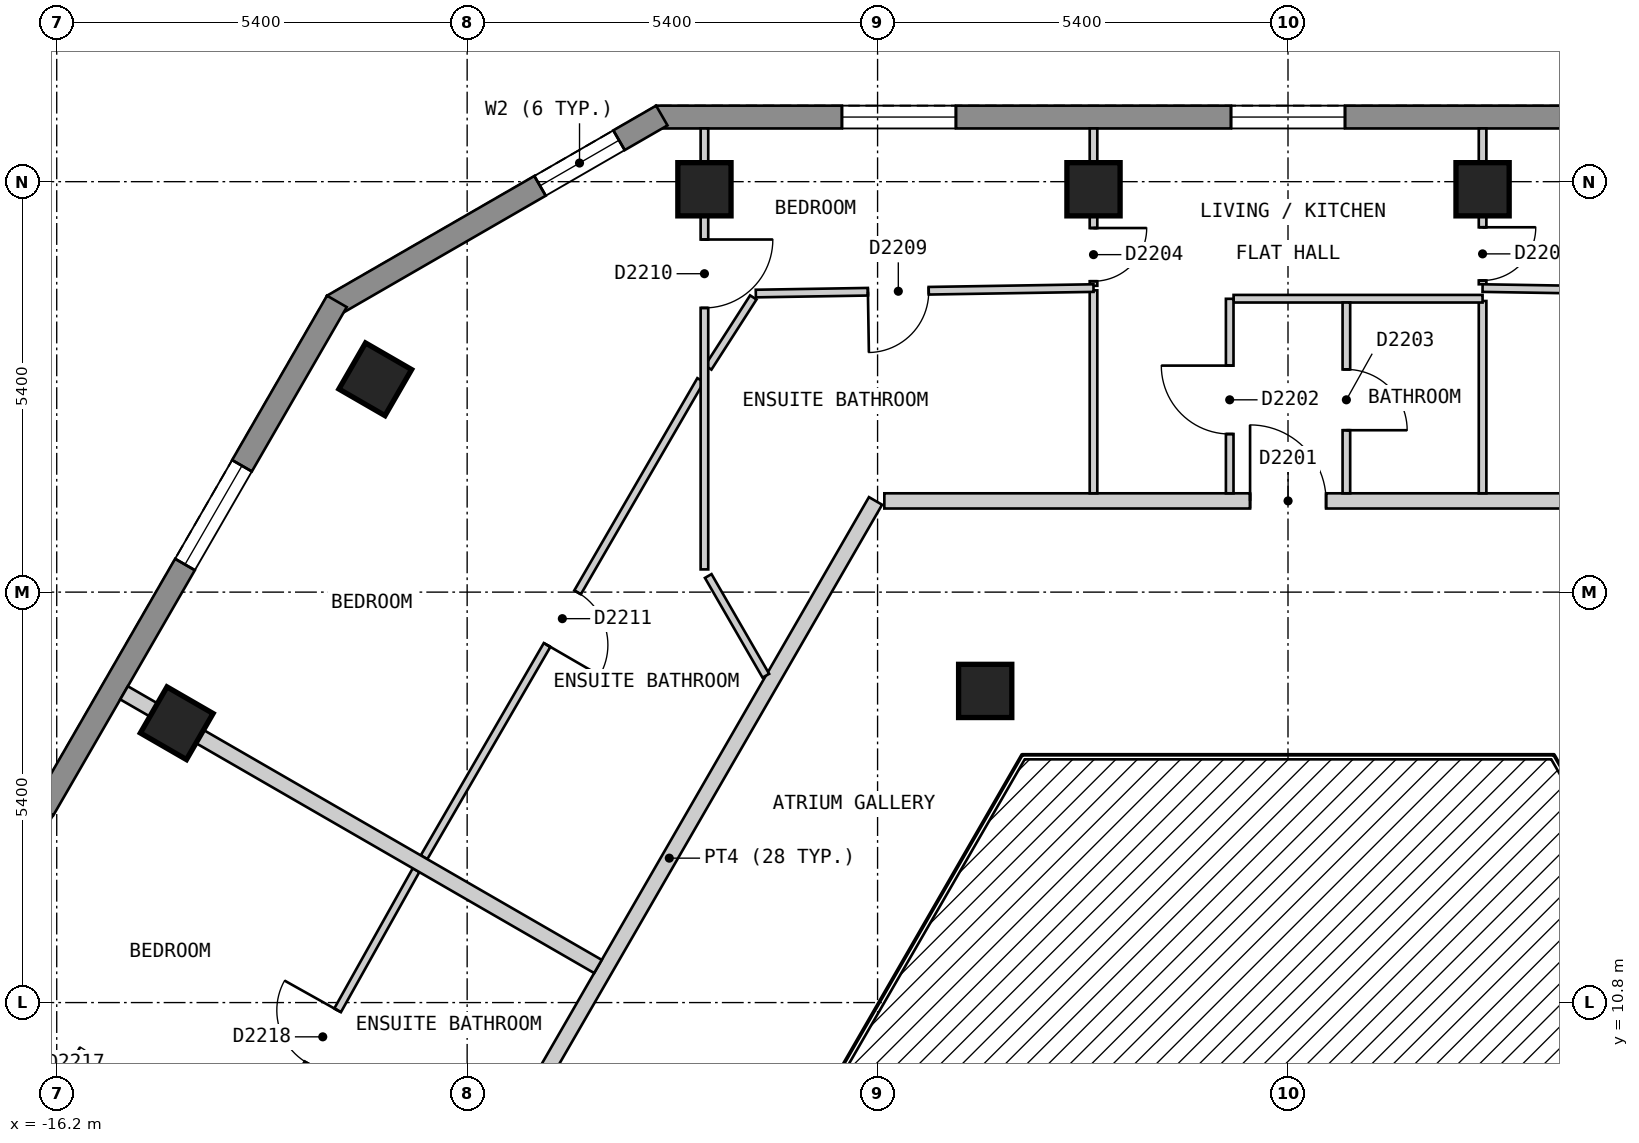
"""IFC4 building model, lengths in metres.
Left out: names, types, materials, properties, quantities, classifications, styles, units other than length and angle.
Written with IfcOpenShell. Run it as: python <this file> out.ifc"""

import sys

from ifc_helpers import new_model, si_unit, direction, frame, frame_2d, origin, origin_2d, place, context, subcontext, project, spatial, polyline, rectangle, outline, extrude, element, fill, save


model = new_model("IFC4")
c1 = context("Model", 3, precision=1e-05, world=origin(), true_north=direction((0.0, 1.0)))
c2 = subcontext(c1, "Body", "Model", "MODEL_VIEW")
j1 = project(units=[si_unit("LENGTHUNIT", "METRE"), si_unit("PLANEANGLEUNIT", "RADIAN")], contexts=[c1])
p1 = place(None, origin())
s1 = spatial("IfcSite", under=j1, at=p1, CompositionType="ELEMENT")
p2 = place(p1, origin())
s2 = spatial("IfcBuilding", under=s1, at=p2, CompositionType="ELEMENT")
p3 = place(p2, frame((0.0, 0.0, 229.8)))
s3 = spatial("IfcBuildingStorey", under=s2, at=p3, CompositionType="ELEMENT", Elevation=229.8)
for number, where, z_axis, x_axis in (
    (1, (2.56, 21.5, 0.0), (0.0, 0.0, 1.0), (-1.0, 0.0, 0.0)),
    (2, (-2.559, 21.5, 0.0), (0.0, 0.0, 1.0), (-1.0, 0.0, 0.0)),
    (3, (-7.678, 21.5, 0.0), (0.0, 0.0, 1.0), (-1.0, 0.0, 0.0)),
    (4, (-12.009, 19.0, 0.0), (0.0, 0.0, 1.0), (-0.5, -0.866, 0.0)),
    (5, (-14.621, 14.475, 0.0), (0.0, 0.0, 1.0), (-0.5, -0.866, 0.0)),
    (6, (-3.984, 14.9, 0.0), (0.0, 0.0, 1.0), (1.0, 0.0, 0.0)),
):
    element("IfcColumn", number, at=place(p3, frame(where, z_axis=z_axis, x_axis=x_axis)), inside=s3, PredefinedType="COLUMN", context=c2, shape_type="SweptSolid", body=[
        extrude(rectangle(XDim=0.7, YDim=0.7, at=origin_2d()), origin(), (0.0, 0.0, 1.0), 3.0),
    ])
p4 = place(p3, frame((8.314, 22.45, 0.0), z_axis=(0.0, 0.0, 1.0), x_axis=(-1.0, 0.0, 0.0)))
e7 = element("IfcWall", 7, at=p4, inside=s3, PredefinedType="SOLIDWALL", context=c2, shape_type="SweptSolid", body=[
    extrude(outline(polyline([(0.0, -0.15), (16.628, -0.15), (16.548, 0.15), (0.08, 0.15), (0.0, -0.15)])), origin(), (0.0, 0.0, 1.0), 2.7),
])
p5 = place(p4, frame((2.444, 0.0, 0.15)))
e8 = element("IfcOpeningElement", 8, at=p5, cuts=e7, PredefinedType="OPENING", context=c2, shape_type="SweptSolid", body=[
    extrude(rectangle(XDim=1.5, YDim=2.1, at=frame_2d((0.75, 1.05))), frame((0.0, 0.16, 0.0), z_axis=(0.0, -1.0, 0.0), x_axis=(1.0, 0.0, 0.0)), (0.0, 0.0, 1.0), 0.32),
])
p6 = place(p4, frame((7.564, 0.0, 0.15)))
e9 = element("IfcOpeningElement", 9, at=p6, cuts=e7, PredefinedType="OPENING", context=c2, shape_type="SweptSolid", body=[
    extrude(rectangle(XDim=1.5, YDim=2.1, at=frame_2d((0.75, 1.05))), frame((0.0, 0.16, 0.0), z_axis=(0.0, -1.0, 0.0), x_axis=(1.0, 0.0, 0.0)), (0.0, 0.0, 1.0), 0.32),
])
p7 = place(p4, frame((12.683, 0.0, 0.15)))
e10 = element("IfcOpeningElement", 10, at=p7, cuts=e7, PredefinedType="OPENING", context=c2, shape_type="SweptSolid", body=[
    extrude(rectangle(XDim=1.5, YDim=2.1, at=frame_2d((0.75, 1.05))), frame((0.0, 0.16, 0.0), z_axis=(0.0, -1.0, 0.0), x_axis=(1.0, 0.0, 0.0)), (0.0, 0.0, 1.0), 0.32),
])
p8 = place(p3, frame((-8.239, 22.47, 0.0), z_axis=(0.0, 0.0, 1.0), x_axis=(-0.866022959057, -0.500004234368, 0.0)))
e11 = element("IfcWall", 11, at=p8, inside=s3, PredefinedType="SOLIDWALL", context=c2, shape_type="SweptSolid", body=[
    extrude(outline(polyline([(0.0, -0.15), (5.0, -0.15), (4.92, 0.15), (0.08, 0.15), (0.0, -0.15)])), origin(), (0.0, 0.0, 1.0), 2.7),
])
p9 = place(p8, frame((0.65, 0.0, 0.15)))
e12 = element("IfcOpeningElement", 12, at=p9, cuts=e11, PredefinedType="OPENING", context=c2, shape_type="SweptSolid", body=[
    extrude(rectangle(XDim=1.2, YDim=2.1, at=frame_2d((0.6, 1.05))), frame((0.0, 0.16, 0.0), z_axis=(0.0, -1.0, 0.0), x_axis=(1.0, 0.0, 0.0)), (0.0, 0.0, 1.0), 0.32),
])
p10 = place(p3, frame((-12.514, 20.025, 0.0), z_axis=(0.0, 0.0, 1.0), x_axis=(-0.500003656944, -0.866023292436, 0.0)))
e13 = element("IfcWall", 13, at=p10, inside=s3, PredefinedType="SOLIDWALL", context=c2, shape_type="SweptSolid", body=[
    extrude(outline(polyline([(0.0, -0.15), (22.17, -0.15), (22.09, 0.15), (0.08, 0.15), (0.0, -0.15)])), origin(), (0.0, 0.0, 1.0), 2.7),
])
p11 = place(p10, frame((2.497, 0.0, 0.15)))
e14 = element("IfcOpeningElement", 14, at=p11, cuts=e13, PredefinedType="OPENING", context=c2, shape_type="SweptSolid", body=[
    extrude(rectangle(XDim=1.5, YDim=2.1, at=frame_2d((0.75, 1.05))), frame((0.0, 0.16, 0.0), z_axis=(0.0, -1.0, 0.0), x_axis=(1.0, 0.0, 0.0)), (0.0, 0.0, 1.0), 0.32),
])
p12 = place(p10, frame((7.722, 0.0, 0.15)))
e15 = element("IfcOpeningElement", 15, at=p12, cuts=e13, PredefinedType="OPENING", context=c2, shape_type="SweptSolid", body=[
    extrude(rectangle(XDim=1.5, YDim=2.1, at=frame_2d((0.75, 1.05))), frame((0.0, 0.16, 0.0), z_axis=(0.0, -1.0, 0.0), x_axis=(1.0, 0.0, 0.0)), (0.0, 0.0, 1.0), 0.32),
])
p13 = place(p10, frame((12.948, 0.0, 0.15)))
e16 = element("IfcOpeningElement", 16, at=p13, cuts=e13, PredefinedType="OPENING", context=c2, shape_type="SweptSolid", body=[
    extrude(rectangle(XDim=1.5, YDim=2.1, at=frame_2d((0.75, 1.05))), frame((0.0, 0.16, 0.0), z_axis=(0.0, -1.0, 0.0), x_axis=(1.0, 0.0, 0.0)), (0.0, 0.0, 1.0), 0.32),
])
p14 = place(p10, frame((18.173, 0.0, 0.15)))
e17 = element("IfcOpeningElement", 17, at=p14, cuts=e13, PredefinedType="OPENING", context=c2, shape_type="SweptSolid", body=[
    extrude(rectangle(XDim=1.5, YDim=2.1, at=frame_2d((0.75, 1.05))), frame((0.0, 0.16, 0.0), z_axis=(0.0, -1.0, 0.0), x_axis=(1.0, 0.0, 0.0)), (0.0, 0.0, 1.0), 0.32),
])
p15 = place(p3, frame((-5.311, 17.4, 0.0), z_axis=(0.0, 0.0, 1.0), x_axis=(1.0, 0.0, 0.0)))
e18 = element("IfcWall", 18, at=p15, inside=s3, PredefinedType="PARTITIONING", context=c2, shape_type="SweptSolid", body=[
    extrude(rectangle(XDim=10.737, YDim=0.2, at=frame_2d((5.369, 0.0))), origin(), (0.0, 0.0, 1.0), 2.7),
])
p16 = place(p15, frame((4.812, 0.0, 0.0)))
e19 = element("IfcOpeningElement", 19, at=p16, cuts=e18, PredefinedType="OPENING", context=c2, shape_type="SweptSolid", body=[
    extrude(rectangle(XDim=1.0, YDim=2.1, at=frame_2d((0.5, 1.05))), frame((0.0, 0.11, 0.0), z_axis=(0.0, -1.0, 0.0), x_axis=(1.0, 0.0, 0.0)), (0.0, 0.0, 1.0), 0.22),
])
p17 = place(p3, frame((-10.854, 8.0, 0.0), z_axis=(0.0, 0.0, 1.0), x_axis=(0.499997637144, 0.866026767976, 0.0)))
e20 = element("IfcWall", 20, at=p17, inside=s3, PredefinedType="PARTITIONING", context=c2, shape_type="SweptSolid", body=[
    extrude(rectangle(XDim=10.854, YDim=0.2, at=frame_2d((5.427, 0.0))), origin(), (0.0, 0.0, 1.0), 2.7),
])
p18 = place(p3, frame((-7.628, 16.412, 0.0), z_axis=(0.0, 0.0, 1.0), x_axis=(0.500159472144, -0.86593331292, 0.0)))
e21 = element("IfcWall", 21, at=p18, inside=s3, PredefinedType="PARTITIONING", context=c2, shape_type="SweptSolid", body=[
    extrude(rectangle(XDim=1.515, YDim=0.1, at=frame_2d((0.758, 0.0))), origin(), (0.0, 0.0, 1.0), 2.7),
])
p19 = place(p3, frame((-2.559, 20.17, 0.0), z_axis=(0.0, 0.0, 1.0), x_axis=(0.0, -1.0, 0.0)))
e22 = element("IfcWall", 22, at=p19, inside=s3, PredefinedType="PARTITIONING", context=c2, shape_type="SweptSolid", body=[
    extrude(rectangle(XDim=2.67, YDim=0.1, at=frame_2d((1.335, 0.0))), origin(), (0.0, 0.0, 1.0), 2.7),
])
p20 = place(p3, frame((2.56, 22.3, 0.0), z_axis=(0.0, 0.0, 1.0), x_axis=(0.0, -1.0, 0.0)))
e23 = element("IfcWall", 23, at=p20, inside=s3, PredefinedType="PARTITIONING", context=c2, shape_type="SweptSolid", body=[
    extrude(rectangle(XDim=2.05, YDim=0.1, at=frame_2d((1.025, 0.0))), origin(), (0.0, 0.0, 1.0), 2.7),
])
p21 = place(p20, frame((1.3, 0.0, 0.0)))
e24 = element("IfcOpeningElement", 24, at=p21, cuts=e23, PredefinedType="OPENING", context=c2, shape_type="SweptSolid", body=[
    extrude(rectangle(XDim=0.7, YDim=2.1, at=frame_2d((0.35, 1.05))), frame((0.0, 0.06, 0.0), z_axis=(0.0, -1.0, 0.0), x_axis=(1.0, 0.0, 0.0)), (0.0, 0.0, 1.0), 0.12),
])
p22 = place(p3, frame((2.56, 20.03, 0.0), z_axis=(0.0, 0.0, 1.0), x_axis=(0.0, -1.0, 0.0)))
e25 = element("IfcWall", 25, at=p22, inside=s3, PredefinedType="PARTITIONING", context=c2, shape_type="SweptSolid", body=[
    extrude(rectangle(XDim=2.53, YDim=0.1, at=frame_2d((1.265, 0.0))), origin(), (0.0, 0.0, 1.0), 2.7),
])
p23 = place(p3, frame((2.56, 20.2, 0.0), z_axis=(0.0, 0.0, 1.0), x_axis=(0.999868576801, -0.016212005615, 0.0)))
e26 = element("IfcWall", 26, at=p23, inside=s3, PredefinedType="PARTITIONING", context=c2, shape_type="SweptSolid", body=[
    extrude(rectangle(XDim=4.442, YDim=0.1, at=frame_2d((2.221, 0.0))), origin(), (0.0, 0.0, 1.0), 2.7),
])
p24 = place(p23, frame((2.746, 0.0, 0.0)))
e27 = element("IfcOpeningElement", 27, at=p24, cuts=e26, PredefinedType="OPENING", context=c2, shape_type="SweptSolid", body=[
    extrude(rectangle(XDim=0.8, YDim=2.1, at=frame_2d((0.4, 1.05))), frame((0.0, 0.06, 0.0), z_axis=(0.0, -1.0, 0.0), x_axis=(1.0, 0.0, 0.0)), (0.0, 0.0, 1.0), 0.12),
])
p25 = place(p3, frame((-17.926, 10.35, 0.0), z_axis=(0.0, 0.0, 1.0), x_axis=(0.866018411306, -0.500012111133, 0.0)))
e28 = element("IfcWall", 28, at=p25, inside=s3, PredefinedType="PARTITIONING", context=c2, shape_type="SweptSolid", body=[
    extrude(rectangle(XDim=9.898, YDim=0.1, at=frame_2d((4.949, 0.0))), origin(), (0.0, 0.0, 1.0), 2.7),
])
p26 = place(p25, frame((1.83, 0.0, 0.0)))
e29 = element("IfcOpeningElement", 29, at=p26, cuts=e28, PredefinedType="OPENING", context=c2, shape_type="SweptSolid", body=[
    extrude(rectangle(XDim=0.9, YDim=2.1, at=frame_2d((0.45, 1.05))), frame((0.0, 0.06, 0.0), z_axis=(0.0, -1.0, 0.0), x_axis=(1.0, 0.0, 0.0)), (0.0, 0.0, 1.0), 0.12),
])
p27 = place(p3, frame((-0.716, 20.06, 0.0), z_axis=(0.0, 0.0, 1.0), x_axis=(1.0, 0.0, 0.0)))
e30 = element("IfcWall", 30, at=p27, inside=s3, PredefinedType="PARTITIONING", context=c2, shape_type="SweptSolid", body=[
    extrude(rectangle(XDim=3.276, YDim=0.1, at=frame_2d((1.638, 0.0))), origin(), (0.0, 0.0, 1.0), 2.7),
])
p28 = place(p3, frame((-7.628, 19.154, 0.0), z_axis=(0.0, 0.0, 1.0), x_axis=(0.540600102017, 0.841279697663, 0.0)))
e31 = element("IfcWall", 31, at=p28, inside=s3, PredefinedType="PARTITIONING", context=c2, shape_type="SweptSolid", body=[
    extrude(rectangle(XDim=1.097, YDim=0.1, at=frame_2d((0.548, 0.0))), origin(), (0.0, 0.0, 1.0), 2.7),
])
p29 = place(p3, frame((-11.367, 12.712, 0.0), z_axis=(0.0, 0.0, 1.0), x_axis=(0.501473866443, 0.865172792727, 0.0)))
e32 = element("IfcWall", 32, at=p29, inside=s3, PredefinedType="PARTITIONING", context=c2, shape_type="SweptSolid", body=[
    extrude(rectangle(XDim=7.256, YDim=0.1, at=frame_2d((3.628, 0.0))), origin(), (0.0, 0.0, 1.0), 2.7),
])
p30 = place(p29, frame((3.228, 0.0, 0.0)))
e33 = element("IfcOpeningElement", 33, at=p30, cuts=e32, PredefinedType="OPENING", context=c2, shape_type="SweptSolid", body=[
    extrude(rectangle(XDim=0.8, YDim=2.1, at=frame_2d((0.4, 1.05))), frame((0.0, 0.06, 0.0), z_axis=(0.0, -1.0, 0.0), x_axis=(1.0, 0.0, 0.0)), (0.0, 0.0, 1.0), 0.12),
])
p31 = place(p3, frame((-13.952, 8.113, 0.0), z_axis=(0.0, 0.0, 1.0), x_axis=(0.488568218554, 0.872525699231, 0.0)))
e34 = element("IfcWall", 34, at=p31, inside=s3, PredefinedType="PARTITIONING", context=c2, shape_type="SweptSolid", body=[
    extrude(rectangle(XDim=5.076, YDim=0.1, at=frame_2d((2.538, 0.0))), origin(), (0.0, 0.0, 1.0), 2.7),
])
p32 = place(p31, frame((2.163, 0.0, 0.0)))
e35 = element("IfcOpeningElement", 35, at=p32, cuts=e34, PredefinedType="OPENING", context=c2, shape_type="SweptSolid", body=[
    extrude(rectangle(XDim=0.8, YDim=2.1, at=frame_2d((0.4, 1.05))), frame((0.0, 0.06, 0.0), z_axis=(0.0, -1.0, 0.0), x_axis=(1.0, 0.0, 0.0)), (0.0, 0.0, 1.0), 0.12),
])
p33 = place(p3, frame((0.768, 17.5, 0.0), z_axis=(0.0, 0.0, 1.0), x_axis=(0.0, 1.0, 0.0)))
e36 = element("IfcWall", 36, at=p33, inside=s3, PredefinedType="PARTITIONING", context=c2, shape_type="SweptSolid", body=[
    extrude(rectangle(XDim=2.51, YDim=0.1, at=frame_2d((1.255, 0.0))), origin(), (0.0, 0.0, 1.0), 2.7),
])
p34 = place(p33, frame((0.83, 0.0, 0.0)))
e37 = element("IfcOpeningElement", 37, at=p34, cuts=e36, PredefinedType="OPENING", context=c2, shape_type="SweptSolid", body=[
    extrude(rectangle(XDim=0.8, YDim=2.1, at=frame_2d((0.4, 1.05))), frame((0.0, 0.06, 0.0), z_axis=(0.0, -1.0, 0.0), x_axis=(1.0, 0.0, 0.0)), (0.0, 0.0, 1.0), 0.12),
])
p35 = place(p3, frame((-7.678, 16.499, 0.0), z_axis=(0.0, 0.0, 1.0), x_axis=(0.0, 1.0, 0.0)))
e38 = element("IfcWall", 38, at=p35, inside=s3, PredefinedType="PARTITIONING", context=c2, shape_type="SweptSolid", body=[
    extrude(rectangle(XDim=5.801, YDim=0.1, at=frame_2d((2.9, 0.0))), origin(), (0.0, 0.0, 1.0), 2.7),
])
p36 = place(p35, frame((3.44, 0.0, 0.0)))
e39 = element("IfcOpeningElement", 39, at=p36, cuts=e38, PredefinedType="OPENING", context=c2, shape_type="SweptSolid", body=[
    extrude(rectangle(XDim=0.9, YDim=2.1, at=frame_2d((0.45, 1.05))), frame((0.0, 0.06, 0.0), z_axis=(0.0, -1.0, 0.0), x_axis=(1.0, 0.0, 0.0)), (0.0, 0.0, 1.0), 0.12),
])
p37 = place(p3, frame((-0.767, 17.5, 0.0), z_axis=(0.0, 0.0, 1.0), x_axis=(0.0, 1.0, 0.0)))
e40 = element("IfcWall", 40, at=p37, inside=s3, PredefinedType="PARTITIONING", context=c2, shape_type="SweptSolid", body=[
    extrude(rectangle(XDim=2.559, YDim=0.1, at=frame_2d((1.28, 0.0))), origin(), (0.0, 0.0, 1.0), 2.7),
])
p38 = place(p37, frame((0.78, 0.0, 0.0)))
e41 = element("IfcOpeningElement", 41, at=p38, cuts=e40, PredefinedType="OPENING", context=c2, shape_type="SweptSolid", body=[
    extrude(rectangle(XDim=0.9, YDim=2.1, at=frame_2d((0.45, 1.05))), frame((0.0, 0.06, 0.0), z_axis=(0.0, -1.0, 0.0), x_axis=(1.0, 0.0, 0.0)), (0.0, 0.0, 1.0), 0.12),
])
p39 = place(p3, frame((-2.559, 20.23, 0.0), z_axis=(0.0, 0.0, 1.0), x_axis=(0.0, 1.0, 0.0)))
e42 = element("IfcWall", 42, at=p39, inside=s3, PredefinedType="PARTITIONING", context=c2, shape_type="SweptSolid", body=[
    extrude(rectangle(XDim=2.07, YDim=0.1, at=frame_2d((1.035, 0.0))), origin(), (0.0, 0.0, 1.0), 2.7),
])
p40 = place(p39, frame((0.06, 0.0, 0.0)))
e43 = element("IfcOpeningElement", 43, at=p40, cuts=e42, PredefinedType="OPENING", context=c2, shape_type="SweptSolid", body=[
    extrude(rectangle(XDim=0.7, YDim=2.1, at=frame_2d((0.35, 1.05))), frame((0.0, 0.06, 0.0), z_axis=(0.0, -1.0, 0.0), x_axis=(1.0, 0.0, 0.0)), (0.0, 0.0, 1.0), 0.12),
])
p41 = place(p3, frame((-7.002, 20.128, 0.0), z_axis=(0.0, 0.0, 1.0), x_axis=(0.999868634558, 0.016208443081, 0.0)))
e44 = element("IfcWall", 44, at=p41, inside=s3, PredefinedType="PARTITIONING", context=c2, shape_type="SweptSolid", body=[
    extrude(rectangle(XDim=4.443, YDim=0.1, at=frame_2d((2.222, 0.0))), origin(), (0.0, 0.0, 1.0), 2.7),
])
p42 = place(p41, frame((1.475, 0.0, 0.0)))
e45 = element("IfcOpeningElement", 45, at=p42, cuts=e44, PredefinedType="OPENING", context=c2, shape_type="SweptSolid", body=[
    extrude(rectangle(XDim=0.8, YDim=2.1, at=frame_2d((0.4, 1.05))), frame((0.0, 0.06, 0.0), z_axis=(0.0, -1.0, 0.0), x_axis=(1.0, 0.0, 0.0)), (0.0, 0.0, 1.0), 0.12),
])
p43 = place(p3, frame((-15.314, 14.875, 0.0), z_axis=(0.0, 0.0, 1.0), x_axis=(0.866001485781, -0.500041424909, 0.0)))
e46 = element("IfcWall", 46, at=p43, inside=s3, PredefinedType="PARTITIONING", context=c2, shape_type="SweptSolid", body=[
    extrude(rectangle(XDim=7.2, YDim=0.2, at=frame_2d((3.6, 0.0))), origin(), (0.0, 0.0, 1.0), 2.7),
])
p44 = place(p6, origin())
e47 = element("IfcWindow", 47, at=p44, inside=s3, PartitioningType="SINGLE_PANEL", PredefinedType="WINDOW", context=c2, shape_type="SweptSolid", body=[
    extrude(rectangle(XDim=1.5, YDim=2.1, at=frame_2d((0.75, 1.05))), frame((0.0, 0.03, 0.0), z_axis=(0.0, -1.0, 0.0), x_axis=(1.0, 0.0, 0.0)), (0.0, 0.0, 1.0), 0.06),
])
fill(e9, e47)
p45 = place(p7, origin())
e48 = element("IfcWindow", 48, at=p45, inside=s3, PartitioningType="SINGLE_PANEL", PredefinedType="WINDOW", context=c2, shape_type="SweptSolid", body=[
    extrude(rectangle(XDim=1.5, YDim=2.1, at=frame_2d((0.75, 1.05))), frame((0.0, 0.03, 0.0), z_axis=(0.0, -1.0, 0.0), x_axis=(1.0, 0.0, 0.0)), (0.0, 0.0, 1.0), 0.06),
])
fill(e10, e48)
p46 = place(p9, origin())
e49 = element("IfcWindow", 49, at=p46, inside=s3, PartitioningType="SINGLE_PANEL", PredefinedType="WINDOW", context=c2, shape_type="SweptSolid", body=[
    extrude(rectangle(XDim=1.2, YDim=2.1, at=frame_2d((0.6, 1.05))), frame((0.0, 0.03, 0.0), z_axis=(0.0, -1.0, 0.0), x_axis=(1.0, 0.0, 0.0)), (0.0, 0.0, 1.0), 0.06),
])
fill(e12, e49)
p47 = place(p11, origin())
e50 = element("IfcWindow", 50, at=p47, inside=s3, PartitioningType="SINGLE_PANEL", PredefinedType="WINDOW", context=c2, shape_type="SweptSolid", body=[
    extrude(rectangle(XDim=1.5, YDim=2.1, at=frame_2d((0.75, 1.05))), frame((0.0, 0.03, 0.0), z_axis=(0.0, -1.0, 0.0), x_axis=(1.0, 0.0, 0.0)), (0.0, 0.0, 1.0), 0.06),
])
fill(e14, e50)
p48 = place(p16, origin())
e51 = element("IfcDoor", 51, at=p48, inside=s3, OperationType="SINGLE_SWING_LEFT", PredefinedType="DOOR", context=c2, shape_type="SweptSolid", body=[
    extrude(rectangle(XDim=1.0, YDim=2.1, at=frame_2d((0.5, 1.05))), frame((0.0, 0.025, 0.0), z_axis=(0.0, -1.0, 0.0), x_axis=(1.0, 0.0, 0.0)), (0.0, 0.0, 1.0), 0.05),
])
fill(e19, e51)
p49 = place(p38, origin())
e52 = element("IfcDoor", 52, at=p49, inside=s3, OperationType="SINGLE_SWING_RIGHT", PredefinedType="DOOR", context=c2, shape_type="SweptSolid", body=[
    extrude(rectangle(XDim=0.9, YDim=2.1, at=frame_2d((0.45, 1.05))), frame((0.0, 0.025, 0.0), z_axis=(0.0, -1.0, 0.0), x_axis=(1.0, 0.0, 0.0)), (0.0, 0.0, 1.0), 0.05),
])
fill(e41, e52)
p50 = place(p34, origin())
e53 = element("IfcDoor", 53, at=p50, inside=s3, OperationType="SINGLE_SWING_LEFT", PredefinedType="DOOR", context=c2, shape_type="SweptSolid", body=[
    extrude(rectangle(XDim=0.8, YDim=2.1, at=frame_2d((0.4, 1.05))), frame((0.0, 0.025, 0.0), z_axis=(0.0, -1.0, 0.0), x_axis=(1.0, 0.0, 0.0)), (0.0, 0.0, 1.0), 0.05),
])
fill(e37, e53)
p51 = place(p40, origin())
e54 = element("IfcDoor", 54, at=p51, inside=s3, OperationType="SINGLE_SWING_RIGHT", PredefinedType="DOOR", context=c2, shape_type="SweptSolid", body=[
    extrude(rectangle(XDim=0.7, YDim=2.1, at=frame_2d((0.35, 1.05))), frame((0.0, 0.025, 0.0), z_axis=(0.0, -1.0, 0.0), x_axis=(1.0, 0.0, 0.0)), (0.0, 0.0, 1.0), 0.05),
])
fill(e43, e54)
p52 = place(p21, origin())
e55 = element("IfcDoor", 55, at=p52, inside=s3, OperationType="SINGLE_SWING_LEFT", PredefinedType="DOOR", context=c2, shape_type="SweptSolid", body=[
    extrude(rectangle(XDim=0.7, YDim=2.1, at=frame_2d((0.35, 1.05))), frame((0.0, 0.025, 0.0), z_axis=(0.0, -1.0, 0.0), x_axis=(1.0, 0.0, 0.0)), (0.0, 0.0, 1.0), 0.05),
])
fill(e24, e55)
p53 = place(p42, origin())
e56 = element("IfcDoor", 56, at=p53, inside=s3, OperationType="SINGLE_SWING_LEFT", PredefinedType="DOOR", context=c2, shape_type="SweptSolid", body=[
    extrude(rectangle(XDim=0.8, YDim=2.1, at=frame_2d((0.4, 1.05))), frame((0.0, 0.025, 0.0), z_axis=(0.0, -1.0, 0.0), x_axis=(1.0, 0.0, 0.0)), (0.0, 0.0, 1.0), 0.05),
])
fill(e45, e56)
p54 = place(p36, origin())
e57 = element("IfcDoor", 57, at=p54, inside=s3, OperationType="SINGLE_SWING_RIGHT", PredefinedType="DOOR", context=c2, shape_type="SweptSolid", body=[
    extrude(rectangle(XDim=0.9, YDim=2.1, at=frame_2d((0.45, 1.05))), frame((0.0, 0.025, 0.0), z_axis=(0.0, -1.0, 0.0), x_axis=(1.0, 0.0, 0.0)), (0.0, 0.0, 1.0), 0.05),
])
fill(e39, e57)
p55 = place(p30, origin())
e58 = element("IfcDoor", 58, at=p55, inside=s3, OperationType="SINGLE_SWING_LEFT", PredefinedType="DOOR", context=c2, shape_type="SweptSolid", body=[
    extrude(rectangle(XDim=0.8, YDim=2.1, at=frame_2d((0.4, 1.05))), frame((0.0, 0.025, 0.0), z_axis=(0.0, -1.0, 0.0), x_axis=(1.0, 0.0, 0.0)), (0.0, 0.0, 1.0), 0.05),
])
fill(e33, e58)
p56 = place(p32, origin())
e59 = element("IfcDoor", 59, at=p56, inside=s3, OperationType="SINGLE_SWING_RIGHT", PredefinedType="DOOR", context=c2, shape_type="SweptSolid", body=[
    extrude(rectangle(XDim=0.8, YDim=2.1, at=frame_2d((0.4, 1.05))), frame((0.0, 0.025, 0.0), z_axis=(0.0, -1.0, 0.0), x_axis=(1.0, 0.0, 0.0)), (0.0, 0.0, 1.0), 0.05),
])
fill(e35, e59)
save(model, sys.argv[1])
